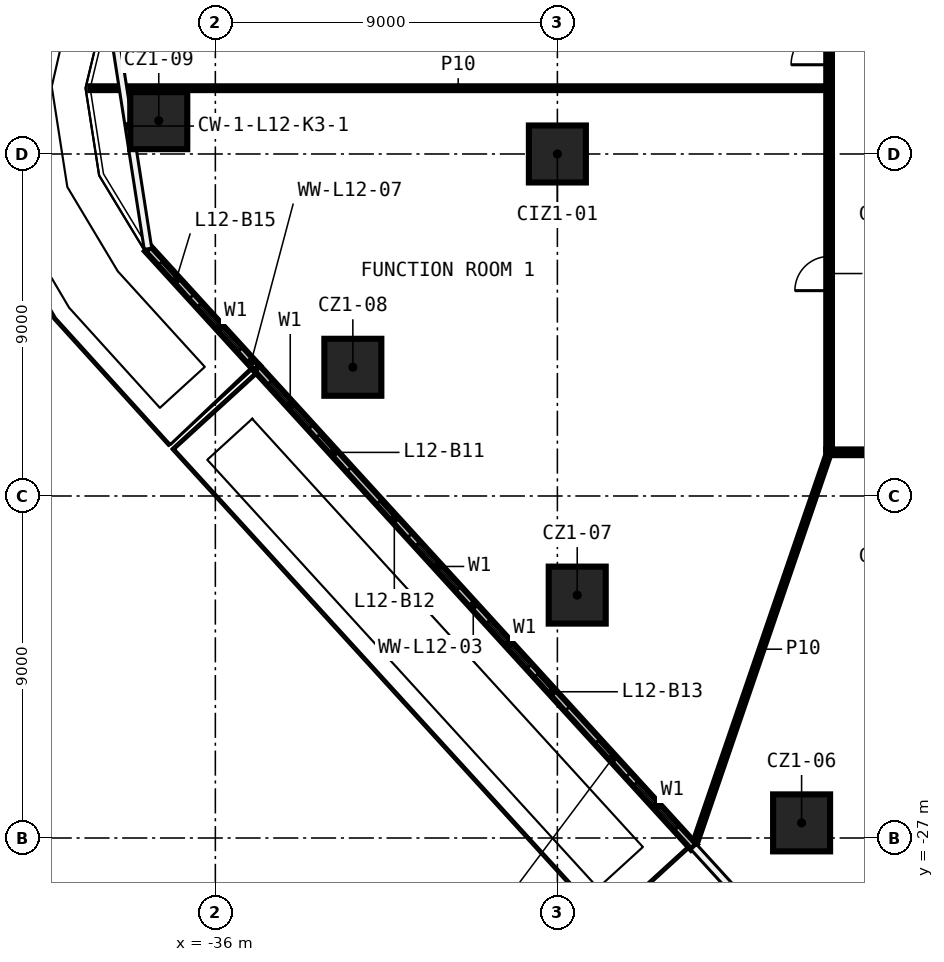
"""IFC4 building model, lengths in metres.
Left out: names, types, materials, properties, quantities, classifications, styles, units other than length and angle.
Written with IfcOpenShell. Run it as: python <this file> out.ifc"""

import sys

from ifc_helpers import new_model, si_unit, direction, frame, frame_2d, origin, origin_2d, place, context, subcontext, project, spatial, rectangle, extrude, element, fill, save


model = new_model("IFC4")
c1 = context("Model", 3, precision=1e-05, world=origin(), true_north=direction((0.0, 1.0)))
c2 = subcontext(c1, "Body", "Model", "MODEL_VIEW")
j1 = project(units=[si_unit("LENGTHUNIT", "METRE"), si_unit("PLANEANGLEUNIT", "RADIAN")], contexts=[c1])
p1 = place(None, origin())
s1 = spatial("IfcSite", under=j1, at=p1, CompositionType="ELEMENT")
p2 = place(p1, origin())
s2 = spatial("IfcBuilding", under=s1, at=p2, CompositionType="ELEMENT")
p3 = place(p2, frame((0.0, 0.0, 66.2)))
s3 = spatial("IfcBuildingStorey", under=s2, at=p3, CompositionType="ELEMENT", Elevation=66.2)
for number, where, z_axis, x_axis in (
    (1, (-20.574, -26.602, 0.0), (0.0, 0.0, 1.0), (1.0, 0.0, 0.0)),
    (2, (-26.478, -20.608, 0.0), (0.0, 0.0, 1.0), (1.0, 0.0, 0.0)),
    (3, (-32.382, -14.613, 0.0), (0.0, 0.0, 1.0), (1.0, 0.0, 0.0)),
    (4, (-37.489, -8.123, 0.0), (0.0, 0.0, 1.0), (1.0, 0.0, 0.0)),
    (5, (-27.0, -9.0, 0.0), (0.0, 0.0, 1.0), (1.0, 0.0, 0.0)),
):
    element("IfcColumn", number, at=place(p3, frame(where, z_axis=z_axis, x_axis=x_axis)), inside=s3, PredefinedType="COLUMN", context=c2, shape_type="SweptSolid", body=[
        extrude(rectangle(XDim=1.5, YDim=1.5, at=origin_2d()), origin(), (0.0, 0.0, 1.0), 3.3),
    ])
p4 = place(p3, frame((19.925, -16.85, 0.0), z_axis=(0.0, 0.0, 1.0), x_axis=(-1.0, 0.0, 0.0)))
e6 = element("IfcWall", 6, at=p4, inside=s3, PredefinedType="PARTITIONING", context=c2, shape_type="SweptSolid", body=[
    extrude(rectangle(XDim=39.85, YDim=0.15, at=frame_2d((19.925, 0.0))), origin(), (0.0, 0.0, 1.0), 3.3),
])
p5 = place(p4, frame((30.959, 0.0, 0.0)))
e7 = element("IfcOpeningElement", 7, at=p5, cuts=e6, PredefinedType="OPENING", context=c2, shape_type="SweptSolid", body=[
    extrude(rectangle(XDim=0.9, YDim=2.1, at=frame_2d((0.45, 1.05))), frame((0.0, 0.085, 0.0), z_axis=(0.0, -1.0, 0.0), x_axis=(1.0, 0.0, 0.0)), (0.0, 0.0, 1.0), 0.17),
])
p6 = place(p4, frame((22.077, 0.0, 0.0)))
e8 = element("IfcOpeningElement", 8, at=p6, cuts=e6, PredefinedType="OPENING", context=c2, shape_type="SweptSolid", body=[
    extrude(rectangle(XDim=0.9, YDim=2.1, at=frame_2d((0.45, 1.05))), frame((0.0, 0.085, 0.0), z_axis=(0.0, -1.0, 0.0), x_axis=(1.0, 0.0, 0.0)), (0.0, 0.0, 1.0), 0.17),
])
p7 = place(p3, frame((-39.293, -7.269, 0.0), z_axis=(0.0, 0.0, 1.0), x_axis=(1.0, 0.0, 0.0)))
e9 = element("IfcWall", 9, at=p7, inside=s3, PredefinedType="PARTITIONING", context=c2, shape_type="SweptSolid", body=[
    extrude(rectangle(XDim=19.368, YDim=0.1, at=frame_2d((9.684, 0.0))), origin(), (0.0, 0.0, 1.0), 3.3),
])
p8 = place(p3, frame((-23.404, -27.213, 0.0), z_axis=(0.0, 0.0, 1.0), x_axis=(0.32441263541, 0.945915663253, 0.0)))
e10 = element("IfcWall", 10, at=p8, inside=s3, PredefinedType="PARTITIONING", context=c2, shape_type="SweptSolid", body=[
    extrude(rectangle(XDim=10.955, YDim=0.1, at=frame_2d((5.478, 0.0))), origin(), (0.0, 0.0, 1.0), 3.3),
])
p9 = place(p3, frame((-19.85, -16.775, 0.0), z_axis=(0.0, 0.0, 1.0), x_axis=(0.0, 1.0, 0.0)))
e11 = element("IfcWall", 11, at=p9, inside=s3, PredefinedType="PARTITIONING", context=c2, shape_type="SweptSolid", body=[
    extrude(rectangle(XDim=33.55, YDim=0.15, at=frame_2d((16.775, 0.0))), origin(), (0.0, 0.0, 1.0), 3.3),
])
p10 = place(p9, frame((10.123, 0.0, 0.0)))
e12 = element("IfcOpeningElement", 12, at=p10, cuts=e11, PredefinedType="OPENING", context=c2, shape_type="SweptSolid", body=[
    extrude(rectangle(XDim=1.0, YDim=2.1, at=frame_2d((0.5, 1.05))), frame((0.0, 0.085, 0.0), z_axis=(0.0, -1.0, 0.0), x_axis=(1.0, 0.0, 0.0)), (0.0, 0.0, 1.0), 0.17),
])
p11 = place(p9, frame((4.179, 0.0, 0.0)))
e13 = element("IfcOpeningElement", 13, at=p11, cuts=e11, PredefinedType="OPENING", context=c2, shape_type="SweptSolid", body=[
    extrude(rectangle(XDim=0.9, YDim=2.1, at=frame_2d((0.45, 1.05))), frame((0.0, 0.085, 0.0), z_axis=(0.0, -1.0, 0.0), x_axis=(1.0, 0.0, 0.0)), (0.0, 0.0, 1.0), 0.17),
])
p12 = place(p9, frame((27.651, 0.0, 0.0)))
e14 = element("IfcOpeningElement", 14, at=p12, cuts=e11, PredefinedType="OPENING", context=c2, shape_type="SweptSolid", body=[
    extrude(rectangle(XDim=1.0, YDim=2.1, at=frame_2d((0.5, 1.05))), frame((0.0, 0.085, 0.0), z_axis=(0.0, -1.0, 0.0), x_axis=(1.0, 0.0, 0.0)), (0.0, 0.0, 1.0), 0.17),
])
p13 = place(p9, frame((20.601, 0.0, 0.0)))
e15 = element("IfcOpeningElement", 15, at=p13, cuts=e11, PredefinedType="OPENING", context=c2, shape_type="SweptSolid", body=[
    extrude(rectangle(XDim=1.0, YDim=2.1, at=frame_2d((0.5, 1.05))), frame((0.0, 0.085, 0.0), z_axis=(0.0, -1.0, 0.0), x_axis=(1.0, 0.0, 0.0)), (0.0, 0.0, 1.0), 0.17),
])
p14 = place(p3, frame((-34.906, -14.636, 0.0), z_axis=(0.0, 0.0, 1.0), x_axis=(0.674011334321, -0.738721003632, 0.0)))
e16 = element("IfcWall", 16, at=p14, inside=s3, PredefinedType="SOLIDWALL", context=c2, shape_type="SweptSolid", body=[
    extrude(rectangle(XDim=17.053, YDim=0.2, at=frame_2d((8.527, 0.0))), origin(), (0.0, 0.0, 1.0), 3.3),
])
p15 = place(p14, frame((0.5, 0.0, 0.6)))
e17 = element("IfcOpeningElement", 17, at=p15, cuts=e16, PredefinedType="OPENING", context=c2, shape_type="SweptSolid", body=[
    extrude(rectangle(XDim=1.6, YDim=2.4, at=frame_2d((0.8, 1.2))), frame((0.0, 0.11, 0.0), z_axis=(0.0, -1.0, 0.0), x_axis=(1.0, 0.0, 0.0)), (0.0, 0.0, 1.0), 0.22),
])
p16 = place(p14, frame((2.4, 0.0, 0.0)))
e18 = element("IfcOpeningElement", 18, at=p16, cuts=e16, PredefinedType="OPENING", context=c2, shape_type="SweptSolid", body=[
    extrude(rectangle(XDim=1.2, YDim=2.4, at=frame_2d((0.6, 1.2))), frame((0.0, 0.11, 0.0), z_axis=(0.0, -1.0, 0.0), x_axis=(1.0, 0.0, 0.0)), (0.0, 0.0, 1.0), 0.22),
])
p17 = place(p14, frame((6.263, 0.0, 0.6)))
e19 = element("IfcOpeningElement", 19, at=p17, cuts=e16, PredefinedType="OPENING", context=c2, shape_type="SweptSolid", body=[
    extrude(rectangle(XDim=1.6, YDim=2.4, at=frame_2d((0.8, 1.2))), frame((0.0, 0.11, 0.0), z_axis=(0.0, -1.0, 0.0), x_axis=(1.0, 0.0, 0.0)), (0.0, 0.0, 1.0), 0.22),
])
p18 = place(p14, frame((4.763, 0.0, 0.0)))
e20 = element("IfcOpeningElement", 20, at=p18, cuts=e16, PredefinedType="OPENING", context=c2, shape_type="SweptSolid", body=[
    extrude(rectangle(XDim=1.2, YDim=2.4, at=frame_2d((0.6, 1.2))), frame((0.0, 0.11, 0.0), z_axis=(0.0, -1.0, 0.0), x_axis=(1.0, 0.0, 0.0)), (0.0, 0.0, 1.0), 0.22),
])
p19 = place(p14, frame((9.027, 0.0, 0.6)))
e21 = element("IfcOpeningElement", 21, at=p19, cuts=e16, PredefinedType="OPENING", context=c2, shape_type="SweptSolid", body=[
    extrude(rectangle(XDim=1.6, YDim=2.4, at=frame_2d((0.8, 1.2))), frame((0.0, 0.11, 0.0), z_axis=(0.0, -1.0, 0.0), x_axis=(1.0, 0.0, 0.0)), (0.0, 0.0, 1.0), 0.22),
])
p20 = place(p14, frame((10.927, 0.0, 0.0)))
e22 = element("IfcOpeningElement", 22, at=p20, cuts=e16, PredefinedType="OPENING", context=c2, shape_type="SweptSolid", body=[
    extrude(rectangle(XDim=1.2, YDim=2.4, at=frame_2d((0.6, 1.2))), frame((0.0, 0.11, 0.0), z_axis=(0.0, -1.0, 0.0), x_axis=(1.0, 0.0, 0.0)), (0.0, 0.0, 1.0), 0.22),
])
p21 = place(p14, frame((14.79, 0.0, 0.6)))
e23 = element("IfcOpeningElement", 23, at=p21, cuts=e16, PredefinedType="OPENING", context=c2, shape_type="SweptSolid", body=[
    extrude(rectangle(XDim=1.6, YDim=2.4, at=frame_2d((0.8, 1.2))), frame((0.0, 0.11, 0.0), z_axis=(0.0, -1.0, 0.0), x_axis=(1.0, 0.0, 0.0)), (0.0, 0.0, 1.0), 0.22),
])
p22 = place(p14, frame((13.29, 0.0, 0.0)))
e24 = element("IfcOpeningElement", 24, at=p22, cuts=e16, PredefinedType="OPENING", context=c2, shape_type="SweptSolid", body=[
    extrude(rectangle(XDim=1.2, YDim=2.4, at=frame_2d((0.6, 1.2))), frame((0.0, 0.11, 0.0), z_axis=(0.0, -1.0, 0.0), x_axis=(1.0, 0.0, 0.0)), (0.0, 0.0, 1.0), 0.22),
])
p23 = place(p3, frame((-37.773, -11.494, 0.0), z_axis=(0.0, 0.0, 1.0), x_axis=(0.673994410995, -0.738736444172, 0.0)))
e25 = element("IfcWall", 25, at=p23, inside=s3, PredefinedType="SOLIDWALL", context=c2, shape_type="SweptSolid", body=[
    extrude(rectangle(XDim=4.254, YDim=0.2, at=frame_2d((2.127, 0.0))), origin(), (0.0, 0.0, 1.0), 3.3),
])
p24 = place(p23, frame((2.0, 0.0, 0.6)))
e26 = element("IfcOpeningElement", 26, at=p24, cuts=e25, PredefinedType="OPENING", context=c2, shape_type="SweptSolid", body=[
    extrude(rectangle(XDim=1.6, YDim=2.4, at=frame_2d((0.8, 1.2))), frame((0.0, 0.11, 0.0), z_axis=(0.0, -1.0, 0.0), x_axis=(1.0, 0.0, 0.0)), (0.0, 0.0, 1.0), 0.22),
])
p25 = place(p23, frame((0.5, 0.0, 0.0)))
e27 = element("IfcOpeningElement", 27, at=p25, cuts=e25, PredefinedType="OPENING", context=c2, shape_type="SweptSolid", body=[
    extrude(rectangle(XDim=1.2, YDim=2.4, at=frame_2d((0.6, 1.2))), frame((0.0, 0.11, 0.0), z_axis=(0.0, -1.0, 0.0), x_axis=(1.0, 0.0, 0.0)), (0.0, 0.0, 1.0), 0.22),
])
p26 = place(p10, origin())
e28 = element("IfcDoor", 28, at=p26, inside=s3, OperationType="SINGLE_SWING_RIGHT", PredefinedType="DOOR", context=c2, shape_type="SweptSolid", body=[
    extrude(rectangle(XDim=1.0, YDim=2.1, at=frame_2d((0.5, 1.05))), frame((0.0, 0.025, 0.0), z_axis=(0.0, -1.0, 0.0), x_axis=(1.0, 0.0, 0.0)), (0.0, 0.0, 1.0), 0.05),
])
fill(e12, e28)
p27 = place(p11, origin())
e29 = element("IfcDoor", 29, at=p27, inside=s3, OperationType="SINGLE_SWING_LEFT", PredefinedType="DOOR", context=c2, shape_type="SweptSolid", body=[
    extrude(rectangle(XDim=0.9, YDim=2.1, at=frame_2d((0.45, 1.05))), frame((0.0, 0.025, 0.0), z_axis=(0.0, -1.0, 0.0), x_axis=(1.0, 0.0, 0.0)), (0.0, 0.0, 1.0), 0.05),
])
fill(e13, e29)
p28 = place(p15, origin())
e30 = element("IfcWindow", 30, at=p28, inside=s3, PartitioningType="SINGLE_PANEL", PredefinedType="WINDOW", context=c2, shape_type="SweptSolid", body=[
    extrude(rectangle(XDim=1.6, YDim=2.4, at=frame_2d((0.8, 1.2))), frame((0.0, 0.03, 0.0), z_axis=(0.0, -1.0, 0.0), x_axis=(1.0, 0.0, 0.0)), (0.0, 0.0, 1.0), 0.06),
])
fill(e17, e30)
p29 = place(p16, origin())
e31 = element("IfcDoor", 31, at=p29, inside=s3, OperationType="SLIDING_TO_LEFT", PredefinedType="DOOR", context=c2, shape_type="SweptSolid", body=[
    extrude(rectangle(XDim=1.2, YDim=2.4, at=frame_2d((0.6, 1.2))), frame((0.0, 0.025, 0.0), z_axis=(0.0, -1.0, 0.0), x_axis=(1.0, 0.0, 0.0)), (0.0, 0.0, 1.0), 0.05),
])
fill(e18, e31)
p30 = place(p17, origin())
e32 = element("IfcWindow", 32, at=p30, inside=s3, PartitioningType="SINGLE_PANEL", PredefinedType="WINDOW", context=c2, shape_type="SweptSolid", body=[
    extrude(rectangle(XDim=1.6, YDim=2.4, at=frame_2d((0.8, 1.2))), frame((0.0, 0.03, 0.0), z_axis=(0.0, -1.0, 0.0), x_axis=(1.0, 0.0, 0.0)), (0.0, 0.0, 1.0), 0.06),
])
fill(e19, e32)
p31 = place(p18, origin())
e33 = element("IfcDoor", 33, at=p31, inside=s3, OperationType="SLIDING_TO_LEFT", PredefinedType="DOOR", context=c2, shape_type="SweptSolid", body=[
    extrude(rectangle(XDim=1.2, YDim=2.4, at=frame_2d((0.6, 1.2))), frame((0.0, 0.025, 0.0), z_axis=(0.0, -1.0, 0.0), x_axis=(1.0, 0.0, 0.0)), (0.0, 0.0, 1.0), 0.05),
])
fill(e20, e33)
p32 = place(p19, origin())
e34 = element("IfcWindow", 34, at=p32, inside=s3, PartitioningType="SINGLE_PANEL", PredefinedType="WINDOW", context=c2, shape_type="SweptSolid", body=[
    extrude(rectangle(XDim=1.6, YDim=2.4, at=frame_2d((0.8, 1.2))), frame((0.0, 0.03, 0.0), z_axis=(0.0, -1.0, 0.0), x_axis=(1.0, 0.0, 0.0)), (0.0, 0.0, 1.0), 0.06),
])
fill(e21, e34)
p33 = place(p20, origin())
e35 = element("IfcDoor", 35, at=p33, inside=s3, OperationType="SLIDING_TO_LEFT", PredefinedType="DOOR", context=c2, shape_type="SweptSolid", body=[
    extrude(rectangle(XDim=1.2, YDim=2.4, at=frame_2d((0.6, 1.2))), frame((0.0, 0.025, 0.0), z_axis=(0.0, -1.0, 0.0), x_axis=(1.0, 0.0, 0.0)), (0.0, 0.0, 1.0), 0.05),
])
fill(e22, e35)
p34 = place(p21, origin())
e36 = element("IfcWindow", 36, at=p34, inside=s3, PartitioningType="SINGLE_PANEL", PredefinedType="WINDOW", context=c2, shape_type="SweptSolid", body=[
    extrude(rectangle(XDim=1.6, YDim=2.4, at=frame_2d((0.8, 1.2))), frame((0.0, 0.03, 0.0), z_axis=(0.0, -1.0, 0.0), x_axis=(1.0, 0.0, 0.0)), (0.0, 0.0, 1.0), 0.06),
])
fill(e23, e36)
p35 = place(p22, origin())
e37 = element("IfcDoor", 37, at=p35, inside=s3, OperationType="SLIDING_TO_LEFT", PredefinedType="DOOR", context=c2, shape_type="SweptSolid", body=[
    extrude(rectangle(XDim=1.2, YDim=2.4, at=frame_2d((0.6, 1.2))), frame((0.0, 0.025, 0.0), z_axis=(0.0, -1.0, 0.0), x_axis=(1.0, 0.0, 0.0)), (0.0, 0.0, 1.0), 0.05),
])
fill(e24, e37)
p36 = place(p24, origin())
e38 = element("IfcWindow", 38, at=p36, inside=s3, PartitioningType="SINGLE_PANEL", PredefinedType="WINDOW", context=c2, shape_type="SweptSolid", body=[
    extrude(rectangle(XDim=1.6, YDim=2.4, at=frame_2d((0.8, 1.2))), frame((0.0, 0.03, 0.0), z_axis=(0.0, -1.0, 0.0), x_axis=(1.0, 0.0, 0.0)), (0.0, 0.0, 1.0), 0.06),
])
fill(e26, e38)
p37 = place(p25, origin())
e39 = element("IfcDoor", 39, at=p37, inside=s3, OperationType="SLIDING_TO_LEFT", PredefinedType="DOOR", context=c2, shape_type="SweptSolid", body=[
    extrude(rectangle(XDim=1.2, YDim=2.4, at=frame_2d((0.6, 1.2))), frame((0.0, 0.025, 0.0), z_axis=(0.0, -1.0, 0.0), x_axis=(1.0, 0.0, 0.0)), (0.0, 0.0, 1.0), 0.05),
])
fill(e27, e39)
save(model, sys.argv[1])
